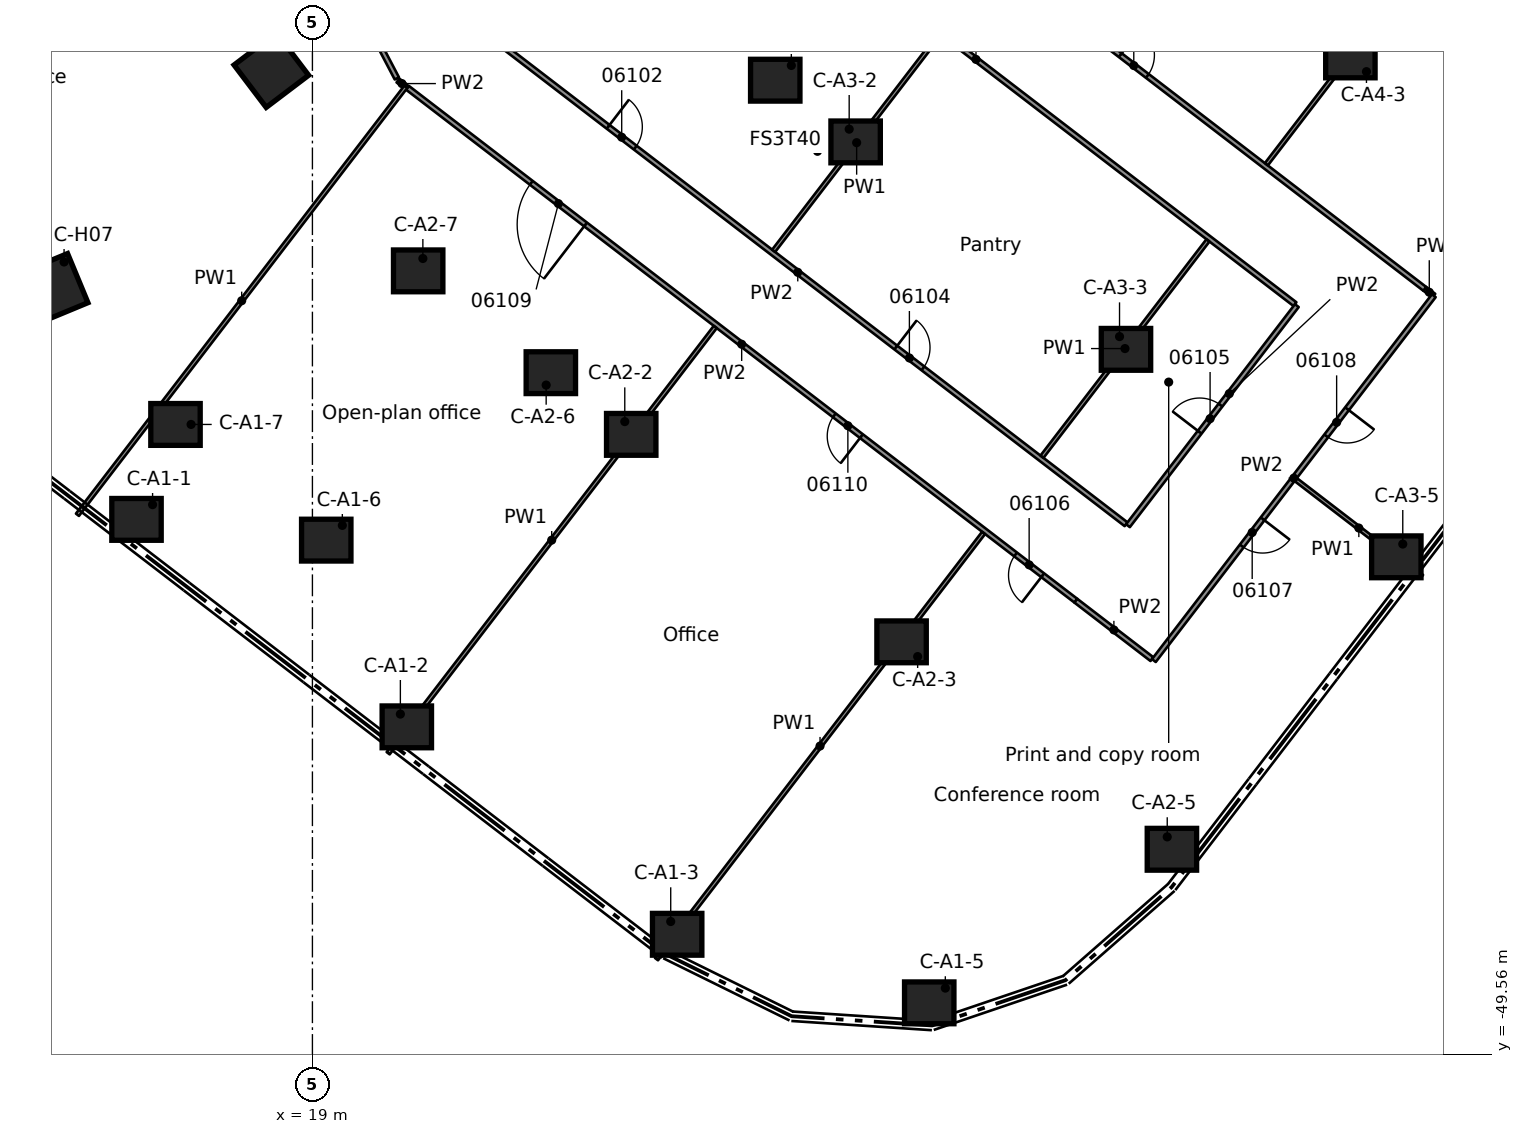
"""IFC4 building model, lengths in metres.
Left out: names, types, materials, properties, quantities, classifications, styles, units other than length and angle.
Written with IfcOpenShell. Run it as: python <this file> out.ifc"""

import sys

from ifc_helpers import new_model, si_unit, direction, frame, frame_2d, origin, origin_2d, place, context, subcontext, project, spatial, rectangle, extrude, element, fill, save


model = new_model("IFC4")
c1 = context("Model", 3, precision=1e-05, world=origin(), true_north=direction((0.0, 1.0)))
c2 = subcontext(c1, "Body", "Model", "MODEL_VIEW")
j1 = project(units=[si_unit("LENGTHUNIT", "METRE"), si_unit("PLANEANGLEUNIT", "RADIAN")], contexts=[c1])
p1 = place(None, origin())
s1 = spatial("IfcSite", under=j1, at=p1, CompositionType="ELEMENT")
p2 = place(p1, origin())
s2 = spatial("IfcBuilding", under=s1, at=p2, CompositionType="ELEMENT")
p3 = place(p2, frame((0.0, 0.0, 29.2)))
s3 = spatial("IfcBuildingStorey", under=s2, at=p3, CompositionType="ELEMENT", Elevation=29.2)
for number, where, z_axis, x_axis in (
    (1, (14.371, -35.48, 0.0), (0.0, 0.0, 1.0), (1.0, 0.0, 0.0)),
    (2, (21.484, -40.939, 0.0), (0.0, 0.0, 1.0), (1.0, 0.0, 0.0)),
    (3, (28.598, -46.397, 0.0), (0.0, 0.0, 1.0), (1.0, 0.0, 0.0)),
    (4, (35.231, -48.201, 0.0), (0.0, 0.0, 1.0), (1.0, 0.0, 0.0)),
    (5, (19.364, -36.026, 0.0), (0.0, 0.0, 1.0), (1.0, 0.0, 0.0)),
    (6, (15.397, -32.982, 0.0), (0.0, 0.0, 1.0), (1.0, 0.0, 0.0)),
    (7, (27.389, -33.243, 0.0), (0.0, 0.0, 1.0), (1.0, 0.0, 0.0)),
    (8, (34.503, -38.702, 0.0), (0.0, 0.0, 1.0), (1.0, 0.0, 0.0)),
    (9, (41.617, -44.16, 0.0), (0.0, 0.0, 1.0), (1.0, 0.0, 0.0)),
    (10, (25.274, -31.62, 0.0), (0.0, 0.0, 1.0), (1.0, 0.0, 0.0)),
    (11, (21.783, -28.941, 0.0), (0.0, 0.0, 1.0), (1.0, 0.0, 0.0)),
    (12, (33.294, -25.548, 0.0), (0.0, 0.0, 1.0), (1.0, 0.0, 0.0)),
    (13, (40.408, -31.006, 0.0), (0.0, 0.0, 1.0), (1.0, 0.0, 0.0)),
    (14, (47.522, -36.465, 0.0), (0.0, 0.0, 1.0), (1.0, 0.0, 0.0)),
    (15, (31.179, -23.924, 0.0), (0.0, 0.0, 1.0), (1.0, 0.0, 0.0)),
    (16, (46.313, -23.311, 0.0), (0.0, 0.0, 1.0), (1.0, 0.0, 0.0)),
):
    element("IfcColumn", number, at=place(p3, frame(where, z_axis=z_axis, x_axis=x_axis)), inside=s3, PredefinedType="COLUMN", context=c2, shape_type="SweptSolid", body=[
        extrude(rectangle(XDim=1.3, YDim=1.1, at=origin_2d()), origin(), (0.0, 0.0, 1.0), 4.1),
    ])
for number, where, z_axis, x_axis in (
    (17, (17.919, -23.659, 0.0), (0.0, 0.0, 1.0), (0.604, -0.797, 0.0)),
    (18, (12.178, -29.4, 0.0), (0.0, 0.0, 1.0), (0.383, -0.924, 0.0)),
):
    element("IfcColumn", number, at=place(p3, frame(where, z_axis=z_axis, x_axis=x_axis)), inside=s3, PredefinedType="COLUMN", context=c2, shape_type="SweptSolid", body=[
        extrude(rectangle(XDim=1.4, YDim=1.4, at=origin_2d()), origin(), (0.0, 0.0, 1.0), 4.1),
    ])
p4 = place(p3, frame((18.615, -18.909, 0.0), z_axis=(0.0, 0.0, 1.0), x_axis=(0.464655649815, -0.885491460769, 0.0)))
e19 = element("IfcWall", 19, at=p4, inside=s3, PredefinedType="PARTITIONING", context=c2, shape_type="SweptSolid", body=[
    extrude(rectangle(XDim=5.61, YDim=0.125, at=frame_2d((2.805, 0.0))), origin(), (0.0, 0.0, 1.0), 3.66),
])
p5 = place(p3, frame((48.27, -29.412, 0.0), z_axis=(0.0, 0.0, 1.0), x_axis=(0.793016893484, -0.609199644328, 0.0)))
e20 = element("IfcWall", 20, at=p5, inside=s3, PredefinedType="PARTITIONING", context=c2, shape_type="SweptSolid", body=[
    extrude(rectangle(XDim=0.3, YDim=0.125, at=frame_2d((0.15, 0.0))), origin(), (0.0, 0.0, 1.0), 3.66),
])
p6 = place(p3, frame((39.09, -37.62, 0.0), z_axis=(0.0, 0.0, 1.0), x_axis=(-0.793364364442, 0.608747061786, 0.0)))
e21 = element("IfcWall", 21, at=p6, inside=s3, PredefinedType="PARTITIONING", context=c2, shape_type="SweptSolid", body=[
    extrude(rectangle(XDim=22.17, YDim=0.125, at=frame_2d((11.085, 0.0))), origin(), (0.0, 0.0, 1.0), 3.66),
])
p7 = place(p6, frame((1.1, 0.0, 0.0)))
e22 = element("IfcOpeningElement", 22, at=p7, cuts=e21, PredefinedType="OPENING", context=c2, shape_type="SweptSolid", body=[
    extrude(rectangle(XDim=0.9, YDim=2.1, at=frame_2d((0.45, 1.05))), frame((0.0, 0.073, 0.0), z_axis=(0.0, -1.0, 0.0), x_axis=(1.0, 0.0, 0.0)), (0.0, 0.0, 1.0), 0.145),
])
p8 = place(p6, frame((16.263, 0.0, 0.0)))
e23 = element("IfcOpeningElement", 23, at=p8, cuts=e21, PredefinedType="OPENING", context=c2, shape_type="SweptSolid", body=[
    extrude(rectangle(XDim=1.8, YDim=2.1, at=frame_2d((0.9, 1.05))), frame((0.0, 0.073, 0.0), z_axis=(0.0, -1.0, 0.0), x_axis=(1.0, 0.0, 0.0)), (0.0, 0.0, 1.0), 0.145),
])
p9 = place(p6, frame((7.113, 0.0, 0.0)))
e24 = element("IfcOpeningElement", 24, at=p9, cuts=e21, PredefinedType="OPENING", context=c2, shape_type="SweptSolid", body=[
    extrude(rectangle(XDim=0.9, YDim=2.1, at=frame_2d((0.45, 1.05))), frame((0.0, 0.073, 0.0), z_axis=(0.0, -1.0, 0.0), x_axis=(1.0, 0.0, 0.0)), (0.0, 0.0, 1.0), 0.145),
])
p10 = place(p3, frame((39.089, -37.62, 0.0), z_axis=(0.0, 0.0, 1.0), x_axis=(0.793216962218, -0.608939119166, 0.0)))
e25 = element("IfcWall", 25, at=p10, inside=s3, PredefinedType="PARTITIONING", context=c2, shape_type="SweptSolid", body=[
    extrude(rectangle(XDim=2.524, YDim=0.125, at=frame_2d((1.262, 0.0))), origin(), (0.0, 0.0, 1.0), 3.66),
])
p11 = place(p3, frame((23.132, -22.35, 0.0), z_axis=(0.0, 0.0, 1.0), x_axis=(0.79336850047, -0.60874167137, 0.0)))
e26 = element("IfcWall", 26, at=p11, inside=s3, PredefinedType="PARTITIONING", context=c2, shape_type="SweptSolid", body=[
    extrude(rectangle(XDim=21.779, YDim=0.125, at=frame_2d((10.89, 0.0))), origin(), (0.0, 0.0, 1.0), 3.66),
])
p12 = place(p11, frame((4.6, 0.0, 0.0)))
e27 = element("IfcOpeningElement", 27, at=p12, cuts=e26, PredefinedType="OPENING", context=c2, shape_type="SweptSolid", body=[
    extrude(rectangle(XDim=0.9, YDim=2.1, at=frame_2d((0.45, 1.05))), frame((0.0, 0.073, 0.0), z_axis=(0.0, -1.0, 0.0), x_axis=(1.0, 0.0, 0.0)), (0.0, 0.0, 1.0), 0.145),
])
p13 = place(p11, frame((14.142, 0.0, 0.0)))
e28 = element("IfcOpeningElement", 28, at=p13, cuts=e26, PredefinedType="OPENING", context=c2, shape_type="SweptSolid", body=[
    extrude(rectangle(XDim=0.9, YDim=2.1, at=frame_2d((0.45, 1.05))), frame((0.0, 0.073, 0.0), z_axis=(0.0, -1.0, 0.0), x_axis=(1.0, 0.0, 0.0)), (0.0, 0.0, 1.0), 0.145),
])
p14 = place(p3, frame((44.875, -34.433, 0.0), z_axis=(0.0, 0.0, 1.0), x_axis=(0.793295570217, -0.60883670904, 0.0)))
e29 = element("IfcWall", 29, at=p14, inside=s3, PredefinedType="PARTITIONING", context=c2, shape_type="SweptSolid", body=[
    extrude(rectangle(XDim=4.186, YDim=0.1, at=frame_2d((2.093, 0.0))), origin(), (0.0, 0.0, 1.0), 3.66),
])
p15 = place(p3, frame((44.855, -29.817, 0.0), z_axis=(0.0, 0.0, 1.0), x_axis=(-0.793378264443, 0.608728945844, 0.0)))
e30 = element("IfcWall", 30, at=p15, inside=s3, PredefinedType="PARTITIONING", context=c2, shape_type="SweptSolid", body=[
    extrude(rectangle(XDim=21.16, YDim=0.125, at=frame_2d((10.58, 0.0))), origin(), (0.0, 0.0, 1.0), 3.66),
])
p16 = place(p15, frame((16.337, 0.0, 0.0)))
e31 = element("IfcOpeningElement", 31, at=p16, cuts=e30, PredefinedType="OPENING", context=c2, shape_type="SweptSolid", body=[
    extrude(rectangle(XDim=0.9, YDim=2.1, at=frame_2d((0.45, 1.05))), frame((0.0, 0.073, 0.0), z_axis=(0.0, -1.0, 0.0), x_axis=(1.0, 0.0, 0.0)), (0.0, 0.0, 1.0), 0.145),
])
p17 = place(p3, frame((28.827, -14.493, 0.0), z_axis=(0.0, 0.0, 1.0), x_axis=(0.793315591759, -0.608810620695, 0.0)))
e32 = element("IfcWall", 32, at=p17, inside=s3, PredefinedType="PARTITIONING", context=c2, shape_type="SweptSolid", body=[
    extrude(rectangle(XDim=24.509, YDim=0.125, at=frame_2d((12.254, 0.0))), origin(), (0.0, 0.0, 1.0), 3.66),
])
p18 = place(p17, frame((4.6, 0.0, 0.0)))
e33 = element("IfcOpeningElement", 33, at=p18, cuts=e32, PredefinedType="OPENING", context=c2, shape_type="SweptSolid", body=[
    extrude(rectangle(XDim=0.9, YDim=2.1, at=frame_2d((0.45, 1.05))), frame((0.0, 0.073, 0.0), z_axis=(0.0, -1.0, 0.0), x_axis=(1.0, 0.0, 0.0)), (0.0, 0.0, 1.0), 0.145),
])
p19 = place(p17, frame((14.407, 0.0, 0.0)))
e34 = element("IfcOpeningElement", 34, at=p19, cuts=e32, PredefinedType="OPENING", context=c2, shape_type="SweptSolid", body=[
    extrude(rectangle(XDim=0.9, YDim=2.1, at=frame_2d((0.45, 1.05))), frame((0.0, 0.073, 0.0), z_axis=(0.0, -1.0, 0.0), x_axis=(1.0, 0.0, 0.0)), (0.0, 0.0, 1.0), 0.145),
])
p20 = place(p3, frame((21.251, -23.933, 0.0), z_axis=(0.0, 0.0, 1.0), x_axis=(0.795537882178, -0.605903852124, 0.0)))
e35 = element("IfcWall", 35, at=p20, inside=s3, PredefinedType="PARTITIONING", context=c2, shape_type="SweptSolid", body=[
    extrude(rectangle(XDim=0.264, YDim=0.125, at=frame_2d((0.132, 0.0))), origin(), (0.0, 0.0, 1.0), 3.66),
])
p21 = place(p3, frame((48.508, -29.595, 0.0), z_axis=(0.0, 0.0, 1.0), x_axis=(-0.608738166201, -0.793371189929, 0.0)))
e36 = element("IfcWall", 36, at=p21, inside=s3, PredefinedType="PARTITIONING", context=c2, shape_type="SweptSolid", body=[
    extrude(rectangle(XDim=12.1, YDim=0.125, at=frame_2d((6.05, 0.0))), origin(), (0.0, 0.0, 1.0), 3.66),
])
p22 = place(p21, frame((7.4, 0.0, 0.0)))
e37 = element("IfcOpeningElement", 37, at=p22, cuts=e36, PredefinedType="OPENING", context=c2, shape_type="SweptSolid", body=[
    extrude(rectangle(XDim=0.9, YDim=2.1, at=frame_2d((0.45, 1.05))), frame((0.0, 0.073, 0.0), z_axis=(0.0, -1.0, 0.0), x_axis=(1.0, 0.0, 0.0)), (0.0, 0.0, 1.0), 0.145),
])
p23 = place(p21, frame((3.75, 0.0, 0.0)))
e38 = element("IfcOpeningElement", 38, at=p23, cuts=e36, PredefinedType="OPENING", context=c2, shape_type="SweptSolid", body=[
    extrude(rectangle(XDim=0.9, YDim=2.1, at=frame_2d((0.45, 1.05))), frame((0.0, 0.073, 0.0), z_axis=(0.0, -1.0, 0.0), x_axis=(1.0, 0.0, 0.0)), (0.0, 0.0, 1.0), 0.145),
])
p24 = place(p3, frame((40.46, -35.646, 0.0), z_axis=(0.0, 0.0, 1.0), x_axis=(0.608868228501, 0.793271378736, 0.0)))
e39 = element("IfcWall", 39, at=p24, inside=s3, PredefinedType="PARTITIONING", context=c2, shape_type="SweptSolid", body=[
    extrude(rectangle(XDim=7.299, YDim=0.125, at=frame_2d((3.649, 0.0))), origin(), (0.0, 0.0, 1.0), 3.66),
])
p25 = place(p24, frame((3.1, 0.0, 0.0)))
e40 = element("IfcOpeningElement", 40, at=p25, cuts=e39, PredefinedType="OPENING", context=c2, shape_type="SweptSolid", body=[
    extrude(rectangle(XDim=0.9, YDim=2.1, at=frame_2d((0.45, 1.05))), frame((0.0, 0.073, 0.0), z_axis=(0.0, -1.0, 0.0), x_axis=(1.0, 0.0, 0.0)), (0.0, 0.0, 1.0), 0.145),
])
p26 = place(p3, frame((28.054, -47.051, 0.0), z_axis=(0.0, 0.0, 1.0), x_axis=(0.608819037892, 0.793309132117, 0.0)))
e41 = element("IfcWall", 41, at=p26, inside=s3, PredefinedType="PARTITIONING", context=c2, shape_type="SweptSolid", body=[
    extrude(rectangle(XDim=14.137, YDim=0.1, at=frame_2d((7.069, 0.0))), origin(), (0.0, 0.0, 1.0), 3.66),
])
p27 = place(p3, frame((38.198, -33.831, 0.0), z_axis=(0.0, 0.0, 1.0), x_axis=(0.60875801413, 0.793355960608, 0.0)))
e42 = element("IfcWall", 42, at=p27, inside=s3, PredefinedType="PARTITIONING", context=c2, shape_type="SweptSolid", body=[
    extrude(rectangle(XDim=7.174, YDim=0.1, at=frame_2d((3.587, 0.0))), origin(), (0.0, 0.0, 1.0), 3.66),
])
p28 = place(p3, frame((44.103, -26.136, 0.0), z_axis=(0.0, 0.0, 1.0), x_axis=(0.608732079898, 0.793375859793, 0.0)))
e43 = element("IfcWall", 43, at=p28, inside=s3, PredefinedType="PARTITIONING", context=c2, shape_type="SweptSolid", body=[
    extrude(rectangle(XDim=14.136, YDim=0.1, at=frame_2d((7.068, 0.0))), origin(), (0.0, 0.0, 1.0), 3.66),
])
p29 = place(p3, frame((20.993, -41.633, 0.0), z_axis=(0.0, 0.0, 1.0), x_axis=(0.608829906099, 0.793300791277, 0.0)))
e44 = element("IfcWall", 44, at=p29, inside=s3, PredefinedType="PARTITIONING", context=c2, shape_type="SweptSolid", body=[
    extrude(rectangle(XDim=14.137, YDim=0.1, at=frame_2d((7.069, 0.0))), origin(), (0.0, 0.0, 1.0), 3.66),
])
p30 = place(p3, frame((31.137, -28.413, 0.0), z_axis=(0.0, 0.0, 1.0), x_axis=(0.608843688194, 0.793290213822, 0.0)))
e45 = element("IfcWall", 45, at=p30, inside=s3, PredefinedType="PARTITIONING", context=c2, shape_type="SweptSolid", body=[
    extrude(rectangle(XDim=7.174, YDim=0.1, at=frame_2d((3.587, 0.0))), origin(), (0.0, 0.0, 1.0), 3.66),
])
p31 = place(p3, frame((12.817, -35.359, 0.0), z_axis=(0.0, 0.0, 1.0), x_axis=(0.608769712687, 0.793346983932, 0.0)))
e46 = element("IfcWall", 46, at=p31, inside=s3, PredefinedType="PARTITIONING", context=c2, shape_type="SweptSolid", body=[
    extrude(rectangle(XDim=14.199, YDim=0.1, at=frame_2d((7.1, 0.0))), origin(), (0.0, 0.0, 1.0), 3.66),
])
p32 = place(p19, origin())
e47 = element("IfcDoor", 47, at=p32, inside=s3, OperationType="SINGLE_SWING_RIGHT", PredefinedType="DOOR", context=c2, shape_type="SweptSolid", body=[
    extrude(rectangle(XDim=0.9, YDim=2.1, at=frame_2d((0.45, 1.05))), frame((0.0, 0.025, 0.0), z_axis=(0.0, -1.0, 0.0), x_axis=(1.0, 0.0, 0.0)), (0.0, 0.0, 1.0), 0.05),
])
fill(e34, e47)
p33 = place(p12, origin())
e48 = element("IfcDoor", 48, at=p33, inside=s3, OperationType="SINGLE_SWING_LEFT", PredefinedType="DOOR", context=c2, shape_type="SweptSolid", body=[
    extrude(rectangle(XDim=0.9, YDim=2.1, at=frame_2d((0.45, 1.05))), frame((0.0, 0.025, 0.0), z_axis=(0.0, -1.0, 0.0), x_axis=(1.0, 0.0, 0.0)), (0.0, 0.0, 1.0), 0.05),
])
fill(e27, e48)
p34 = place(p13, origin())
e49 = element("IfcDoor", 49, at=p34, inside=s3, OperationType="SINGLE_SWING_RIGHT", PredefinedType="DOOR", context=c2, shape_type="SweptSolid", body=[
    extrude(rectangle(XDim=0.9, YDim=2.1, at=frame_2d((0.45, 1.05))), frame((0.0, 0.025, 0.0), z_axis=(0.0, -1.0, 0.0), x_axis=(1.0, 0.0, 0.0)), (0.0, 0.0, 1.0), 0.05),
])
fill(e28, e49)
p35 = place(p25, origin())
e50 = element("IfcDoor", 50, at=p35, inside=s3, OperationType="SINGLE_SWING_LEFT", PredefinedType="DOOR", context=c2, shape_type="SweptSolid", body=[
    extrude(rectangle(XDim=0.9, YDim=2.1, at=frame_2d((0.45, 1.05))), frame((0.0, 0.025, 0.0), z_axis=(0.0, -1.0, 0.0), x_axis=(1.0, 0.0, 0.0)), (0.0, 0.0, 1.0), 0.05),
])
fill(e40, e50)
p36 = place(p7, origin())
e51 = element("IfcDoor", 51, at=p36, inside=s3, OperationType="SINGLE_SWING_LEFT", PredefinedType="DOOR", context=c2, shape_type="SweptSolid", body=[
    extrude(rectangle(XDim=0.9, YDim=2.1, at=frame_2d((0.45, 1.05))), frame((0.0, 0.025, 0.0), z_axis=(0.0, -1.0, 0.0), x_axis=(1.0, 0.0, 0.0)), (0.0, 0.0, 1.0), 0.05),
])
fill(e22, e51)
p37 = place(p22, origin())
e52 = element("IfcDoor", 52, at=p37, inside=s3, OperationType="SINGLE_SWING_RIGHT", PredefinedType="DOOR", context=c2, shape_type="SweptSolid", body=[
    extrude(rectangle(XDim=0.9, YDim=2.1, at=frame_2d((0.45, 1.05))), frame((0.0, 0.025, 0.0), z_axis=(0.0, -1.0, 0.0), x_axis=(1.0, 0.0, 0.0)), (0.0, 0.0, 1.0), 0.05),
])
fill(e37, e52)
p38 = place(p23, origin())
e53 = element("IfcDoor", 53, at=p38, inside=s3, OperationType="SINGLE_SWING_LEFT", PredefinedType="DOOR", context=c2, shape_type="SweptSolid", body=[
    extrude(rectangle(XDim=0.9, YDim=2.1, at=frame_2d((0.45, 1.05))), frame((0.0, 0.025, 0.0), z_axis=(0.0, -1.0, 0.0), x_axis=(1.0, 0.0, 0.0)), (0.0, 0.0, 1.0), 0.05),
])
fill(e38, e53)
p39 = place(p8, origin())
e54 = element("IfcDoor", 54, at=p39, inside=s3, OperationType="DOUBLE_DOOR_SINGLE_SWING", PredefinedType="DOOR", context=c2, shape_type="SweptSolid", body=[
    extrude(rectangle(XDim=1.8, YDim=2.1, at=frame_2d((0.9, 1.05))), frame((0.0, 0.025, 0.0), z_axis=(0.0, -1.0, 0.0), x_axis=(1.0, 0.0, 0.0)), (0.0, 0.0, 1.0), 0.05),
])
fill(e23, e54)
p40 = place(p9, origin())
e55 = element("IfcDoor", 55, at=p40, inside=s3, OperationType="SINGLE_SWING_LEFT", PredefinedType="DOOR", context=c2, shape_type="SweptSolid", body=[
    extrude(rectangle(XDim=0.9, YDim=2.1, at=frame_2d((0.45, 1.05))), frame((0.0, 0.025, 0.0), z_axis=(0.0, -1.0, 0.0), x_axis=(1.0, 0.0, 0.0)), (0.0, 0.0, 1.0), 0.05),
])
fill(e24, e55)
save(model, sys.argv[1])
